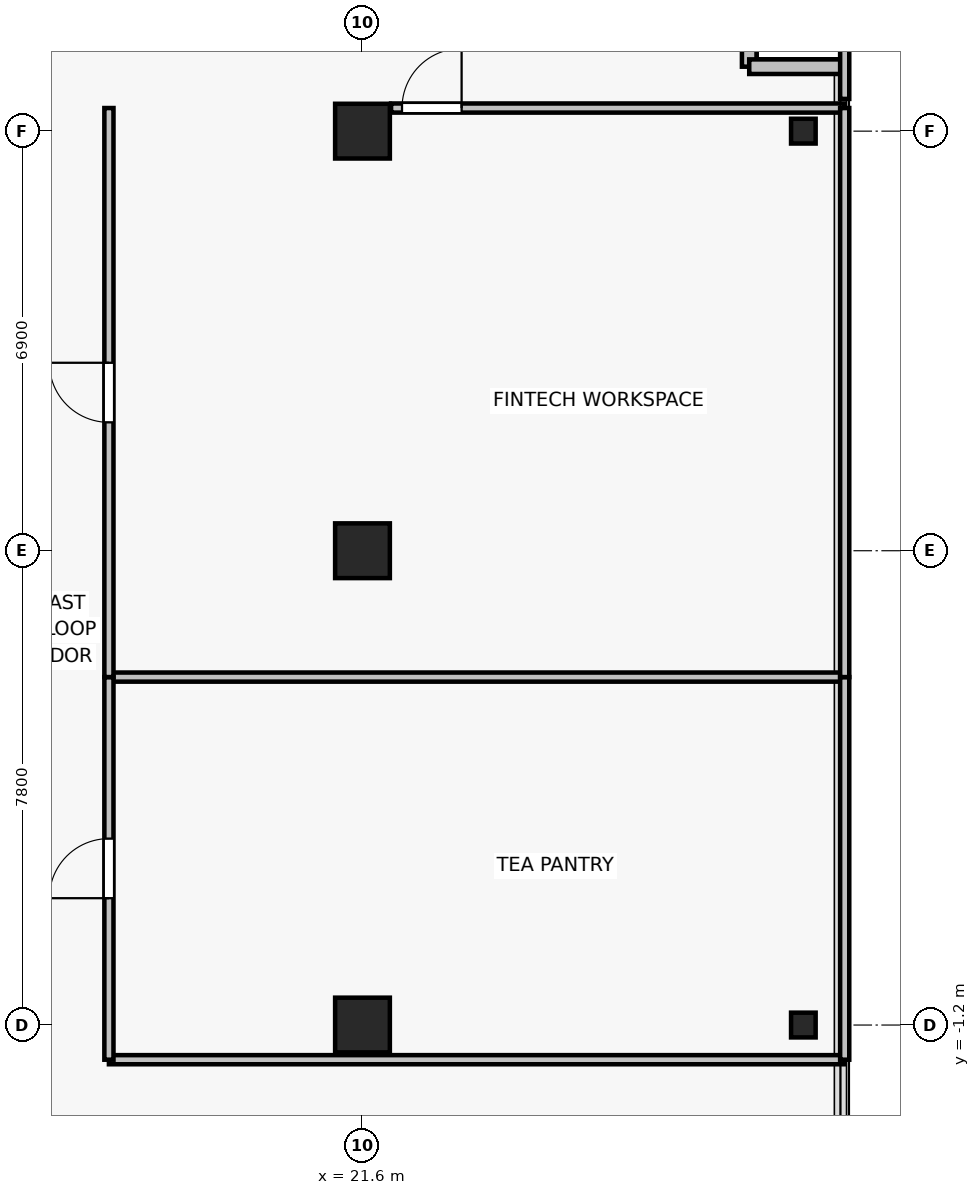
"""IFC4 building model, lengths in metres.
Left out: names, types, materials, properties, quantities, classifications, styles, units other than length and angle.
Written with IfcOpenShell. Run it as: python <this file> out.ifc"""

import sys

from ifc_helpers import new_model, si_unit, direction, frame, frame_2d, origin, origin_2d, place, context, subcontext, project, spatial, rectangle, i_section, extrude, source, transform, mapped, element, fill, save


model = new_model("IFC4")
c1 = context("Model", 3, precision=1e-05, world=origin(), true_north=direction((0.0, 1.0)))
c2 = subcontext(c1, "Body", "Model", "MODEL_VIEW")
j1 = project(units=[si_unit("LENGTHUNIT", "METRE"), si_unit("PLANEANGLEUNIT", "RADIAN")], contexts=[c1])
p1 = place(None, origin())
s1 = spatial("IfcSite", under=j1, at=p1, CompositionType="ELEMENT")
p2 = place(p1, origin())
s2 = spatial("IfcBuilding", under=s1, at=p2, CompositionType="ELEMENT")
p3 = place(p2, frame((0.0, 0.0, 116.5)))
s3 = spatial("IfcBuildingStorey", under=s2, at=p3, CompositionType="ELEMENT", Elevation=116.5)
for number, where, z_axis, x_axis in (
    (1, (21.6, -1.2, 0.0), (0.0, 0.0, 1.0), (1.0, 0.0, 0.0)),
    (2, (21.6, 6.6, 0.0), (0.0, 0.0, 1.0), (1.0, 0.0, 0.0)),
    (3, (21.6, 13.5, 0.0), (0.0, 0.0, 1.0), (1.0, 0.0, 0.0)),
):
    element("IfcColumn", number, at=place(p3, frame(where, z_axis=z_axis, x_axis=x_axis)), inside=s3, PredefinedType="COLUMN", context=c2, shape_type="SweptSolid", body=[
        extrude(rectangle(XDim=0.9, YDim=0.9, at=origin_2d()), origin(), (0.0, 0.0, 1.0), 3.3),
    ])
for number, where, z_axis, x_axis in (
    (4, (28.85, -1.2, 0.0), (0.0, 0.0, 1.0), (1.0, 0.0, 0.0)),
    (5, (28.85, 13.5, 0.0), (0.0, 0.0, 1.0), (1.0, 0.0, 0.0)),
):
    element("IfcColumn", number, at=place(p3, frame(where, z_axis=z_axis, x_axis=x_axis)), inside=s3, PredefinedType="COLUMN", context=c2, shape_type="SweptSolid", body=[
        extrude(i_section(OverallWidth=0.404, OverallDepth=0.407, WebThickness=0.022, FlangeThickness=0.032, FilletRadius=0.015, at=origin_2d()), origin(), (0.0, 0.0, 1.0), 3.3),
    ])
for number, where, z_axis, x_axis in (
    (6, (27.96, 14.56, 0.0), (0.0, 0.0, 1.0), (0.0, 1.0, 0.0)),
    (7, (29.46, 14.56, 0.0), (0.0, 0.0, 1.0), (-1.0, 0.0, 0.0)),
):
    element("IfcWall", number, at=place(p3, frame(where, z_axis=z_axis, x_axis=x_axis)), inside=s3, PredefinedType="SOLIDWALL", context=c2, shape_type="SweptSolid", body=[
        extrude(rectangle(XDim=1.5, YDim=0.24, at=frame_2d((0.75, 0.0))), origin(), (0.0, 0.0, 1.0), 3.075),
    ])
for number, where, z_axis, x_axis in (
    (8, (29.53, -1.77, 0.0), (0.0, 0.0, 1.0), (-1.0, 0.0, 0.0)),
    (9, (17.43, 4.522, 0.0), (0.0, 0.0, 1.0), (1.0, 0.0, 0.0)),
):
    element("IfcWall", number, at=place(p3, frame(where, z_axis=z_axis, x_axis=x_axis)), inside=s3, PredefinedType="PARTITIONING", context=c2, shape_type="SweptSolid", body=[
        extrude(rectangle(XDim=12.1, YDim=0.15, at=frame_2d((6.05, 0.0))), origin(), (0.0, 0.0, 1.0), 2.515),
    ])
p4 = place(p3, frame((17.43, -1.77, 0.0), z_axis=(0.0, 0.0, 1.0), x_axis=(0.0, 1.0, 0.0)))
e10 = element("IfcWall", 10, at=p4, inside=s3, PredefinedType="PARTITIONING", context=c2, shape_type="SweptSolid", body=[
    extrude(rectangle(XDim=6.292, YDim=0.15, at=frame_2d((3.146, 0.0))), origin(), (0.0, 0.0, 1.0), 2.515),
])
p5 = place(p4, frame((2.656, 0.0, 0.0)))
e11 = element("IfcOpeningElement", 11, at=p5, cuts=e10, PredefinedType="OPENING", context=c2, shape_type="SweptSolid", body=[
    extrude(rectangle(XDim=0.98, YDim=2.15, at=frame_2d((0.49, 1.075))), frame((0.0, 0.085, 0.0), z_axis=(0.0, -1.0, 0.0), x_axis=(1.0, 0.0, 0.0)), (0.0, 0.0, 1.0), 0.17),
])
p6 = place(p3, frame((29.53, 4.522, 0.0), z_axis=(0.0, 0.0, 1.0), x_axis=(0.0, -1.0, 0.0)))
e12 = element("IfcWall", 12, at=p6, inside=s3, PredefinedType="PARTITIONING", context=c2, shape_type="SweptSolid", body=[
    extrude(rectangle(XDim=6.292, YDim=0.15, at=frame_2d((3.146, 0.0))), origin(), (0.0, 0.0, 1.0), 3.075),
])
p7 = place(p3, frame((22.07, 13.88, 0.0), z_axis=(0.0, 0.0, 1.0), x_axis=(1.0, 0.0, 0.0)))
e13 = element("IfcWall", 13, at=p7, inside=s3, PredefinedType="PARTITIONING", context=c2, shape_type="SweptSolid", body=[
    extrude(rectangle(XDim=7.46, YDim=0.15, at=frame_2d((3.73, 0.0))), origin(), (0.0, 0.0, 1.0), 3.075),
])
p8 = place(p7, frame((0.18, 0.0, 0.0)))
e14 = element("IfcOpeningElement", 14, at=p8, cuts=e13, PredefinedType="OPENING", context=c2, shape_type="SweptSolid", body=[
    extrude(rectangle(XDim=0.98, YDim=2.15, at=frame_2d((0.49, 1.075))), frame((0.0, 0.085, 0.0), z_axis=(0.0, -1.0, 0.0), x_axis=(1.0, 0.0, 0.0)), (0.0, 0.0, 1.0), 0.17),
])
p9 = place(p3, frame((17.43, 4.522, 0.0), z_axis=(0.0, 0.0, 1.0), x_axis=(0.0, 1.0, 0.0)))
e15 = element("IfcWall", 15, at=p9, inside=s3, PredefinedType="PARTITIONING", context=c2, shape_type="SweptSolid", body=[
    extrude(rectangle(XDim=9.358, YDim=0.15, at=frame_2d((4.679, 0.0))), origin(), (0.0, 0.0, 1.0), 2.515),
])
p10 = place(p9, frame((4.189, 0.0, 0.0)))
e16 = element("IfcOpeningElement", 16, at=p10, cuts=e15, PredefinedType="OPENING", context=c2, shape_type="SweptSolid", body=[
    extrude(rectangle(XDim=0.98, YDim=2.15, at=frame_2d((0.49, 1.075))), frame((0.0, 0.085, 0.0), z_axis=(0.0, -1.0, 0.0), x_axis=(1.0, 0.0, 0.0)), (0.0, 0.0, 1.0), 0.17),
])
p11 = place(p3, frame((29.53, 13.88, 0.0), z_axis=(0.0, 0.0, 1.0), x_axis=(0.0, -1.0, 0.0)))
e17 = element("IfcWall", 17, at=p11, inside=s3, PredefinedType="PARTITIONING", context=c2, shape_type="SweptSolid", body=[
    extrude(rectangle(XDim=9.358, YDim=0.15, at=frame_2d((4.679, 0.0))), origin(), (0.0, 0.0, 1.0), 3.075),
])
p12 = place(p3, frame((29.53, 17.63, 0.0), z_axis=(0.0, 0.0, 1.0), x_axis=(0.0, -1.0, 0.0)))
e18 = element("IfcWall", 18, at=p12, inside=s3, PredefinedType="PARTITIONING", context=c2, shape_type="SweptSolid", body=[
    extrude(rectangle(XDim=3.6, YDim=0.15, at=frame_2d((1.8, 0.0))), origin(), (0.0, 0.0, 1.0), 3.075),
])
m1 = source(origin(), c2, "Body", "SweptSolid", [
    extrude(rectangle(XDim=0.98, YDim=2.15, at=frame_2d((0.49, 1.075))), frame((0.0, 0.025, 0.0), z_axis=(0.0, -1.0, 0.0), x_axis=(1.0, 0.0, 0.0)), (0.0, 0.0, 1.0), 0.05),
])
p13 = place(p5, origin())
e19 = element("IfcDoor", 19, at=p13, inside=s3, OperationType="SINGLE_SWING_LEFT", PredefinedType="DOOR", context=c2, shape_type="MappedRepresentation", body=[
    mapped(m1, transform((0.0, 0.0, 0.0), x_axis=(1.0, 0.0, 0.0), y_axis=(0.0, 1.0, 0.0), z_axis=(0.0, 0.0, 1.0), scale=1.0)),
])
fill(e11, e19)
p14 = place(p10, origin())
e20 = element("IfcDoor", 20, at=p14, inside=s3, OperationType="SINGLE_SWING_RIGHT", PredefinedType="DOOR", context=c2, shape_type="MappedRepresentation", body=[
    mapped(m1, transform((0.0, 0.0, 0.0), x_axis=(1.0, 0.0, 0.0), y_axis=(0.0, 1.0, 0.0), z_axis=(0.0, 0.0, 1.0), scale=1.0)),
])
fill(e16, e20)
p15 = place(p8, origin())
e21 = element("IfcDoor", 21, at=p15, inside=s3, OperationType="SINGLE_SWING_RIGHT", PredefinedType="DOOR", context=c2, shape_type="MappedRepresentation", body=[
    mapped(m1, transform((0.0, 0.0, 0.0), x_axis=(1.0, 0.0, 0.0), y_axis=(0.0, 1.0, 0.0), z_axis=(0.0, 0.0, 1.0), scale=1.0)),
])
fill(e14, e21)
save(model, sys.argv[1])
